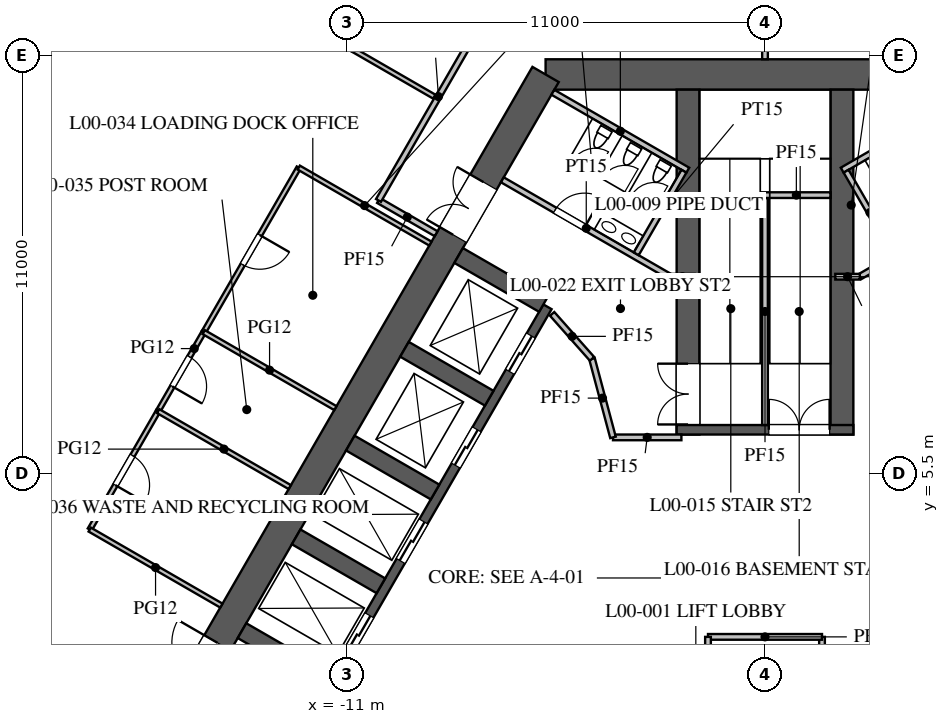
"""IFC4 building model, lengths in metres.
Left out: names, types, materials, properties, quantities, classifications, styles, units other than length and angle.
Written with IfcOpenShell. Run it as: python <this file> out.ifc"""

import sys

from ifc_helpers import new_model, si_unit, direction, frame, frame_2d, origin, place, context, subcontext, project, spatial, polyline, rectangle, outline, extrude, element, fill, save


model = new_model("IFC4")
c1 = context("Model", 3, precision=1e-05, world=origin(), true_north=direction((0.0, 1.0)))
c2 = subcontext(c1, "Body", "Model", "MODEL_VIEW")
j1 = project(units=[si_unit("LENGTHUNIT", "METRE"), si_unit("PLANEANGLEUNIT", "RADIAN")], contexts=[c1])
p1 = place(None, origin())
s1 = spatial("IfcSite", under=j1, at=p1, CompositionType="ELEMENT")
p2 = place(p1, origin())
s2 = spatial("IfcBuilding", under=s1, at=p2, CompositionType="ELEMENT")
p3 = place(p2, origin())
s3 = spatial("IfcBuildingStorey", under=s2, at=p3, CompositionType="ELEMENT", Elevation=0.0)
p4 = place(p3, frame((5.773, 16.0, 0.0), z_axis=(0.0, 0.0, 1.0), x_axis=(-1.0, 0.0, 0.0)))
e1 = element("IfcWall", 1, at=p4, inside=s3, PredefinedType="SHEAR", context=c2, shape_type="SweptSolid", body=[
    extrude(rectangle(XDim=11.547, YDim=0.8, at=frame_2d((5.773, 0.0))), origin(), (0.0, 0.0, 1.0), 6.5),
])
p5 = place(p3, frame((-5.773, 16.0, 0.0), z_axis=(0.0, 0.0, 1.0), x_axis=(-0.500002442456, -0.866023993627, 0.0)))
e2 = element("IfcWall", 2, at=p5, inside=s3, PredefinedType="SHEAR", context=c2, shape_type="SweptSolid", body=[
    extrude(rectangle(XDim=21.939, YDim=0.8, at=frame_2d((10.97, 0.0))), origin(), (0.0, 0.0, 1.0), 6.5),
])
p6 = place(p5, frame((17.27, 0.0, 0.0)))
e3 = element("IfcOpeningElement", 3, at=p6, cuts=e2, PredefinedType="OPENING", context=c2, shape_type="SweptSolid", body=[
    extrude(rectangle(XDim=1.2, YDim=2.1, at=frame_2d((0.6, 1.05))), frame((0.0, 0.41, 0.0), z_axis=(0.0, -1.0, 0.0), x_axis=(1.0, 0.0, 0.0)), (0.0, 0.0, 1.0), 0.82),
])
p7 = place(p5, frame((3.27, 0.0, 0.0)))
e4 = element("IfcOpeningElement", 4, at=p7, cuts=e2, PredefinedType="OPENING", context=c2, shape_type="SweptSolid", body=[
    extrude(rectangle(XDim=1.6, YDim=2.1, at=frame_2d((0.8, 1.05))), frame((0.0, 0.41, 0.0), z_axis=(0.0, -1.0, 0.0), x_axis=(1.0, 0.0, 0.0)), (0.0, 0.0, 1.0), 0.82),
])
p8 = place(p3, frame((-5.724, 9.886, 0.0), z_axis=(0.0, 0.0, 1.0), x_axis=(-0.500001763848, -0.866024385424, 0.0)))
e5 = element("IfcWall", 5, at=p8, inside=s3, PredefinedType="SHEAR", context=c2, shape_type="SweptSolid", body=[
    extrude(rectangle(XDim=11.4, YDim=0.25, at=frame_2d((5.7, 0.0))), origin(), (0.0, 0.0, 1.0), 6.5),
])
p9 = place(p8, frame((0.875, 0.0, 0.0)))
e6 = element("IfcOpeningElement", 6, at=p9, cuts=e5, PredefinedType="OPENING", context=c2, shape_type="SweptSolid", body=[
    extrude(rectangle(XDim=1.1, YDim=2.2, at=frame_2d((0.55, 1.1))), frame((0.0, 0.135, 0.0), z_axis=(0.0, -1.0, 0.0), x_axis=(1.0, 0.0, 0.0)), (0.0, 0.0, 1.0), 0.27),
])
p10 = place(p8, frame((3.725, 0.0, 0.0)))
e7 = element("IfcOpeningElement", 7, at=p10, cuts=e5, PredefinedType="OPENING", context=c2, shape_type="SweptSolid", body=[
    extrude(rectangle(XDim=1.1, YDim=2.2, at=frame_2d((0.55, 1.1))), frame((0.0, 0.135, 0.0), z_axis=(0.0, -1.0, 0.0), x_axis=(1.0, 0.0, 0.0)), (0.0, 0.0, 1.0), 0.27),
])
p11 = place(p8, frame((6.525, 0.0, 0.0)))
e8 = element("IfcOpeningElement", 8, at=p11, cuts=e5, PredefinedType="OPENING", context=c2, shape_type="SweptSolid", body=[
    extrude(rectangle(XDim=1.2, YDim=2.2, at=frame_2d((0.6, 1.1))), frame((0.0, 0.135, 0.0), z_axis=(0.0, -1.0, 0.0), x_axis=(1.0, 0.0, 0.0)), (0.0, 0.0, 1.0), 0.27),
])
p12 = place(p8, frame((9.375, 0.0, 0.0)))
e9 = element("IfcOpeningElement", 9, at=p12, cuts=e5, PredefinedType="OPENING", context=c2, shape_type="SweptSolid", body=[
    extrude(rectangle(XDim=1.2, YDim=2.2, at=frame_2d((0.6, 1.1))), frame((0.0, 0.135, 0.0), z_axis=(0.0, -1.0, 0.0), x_axis=(1.0, 0.0, 0.0)), (0.0, 0.0, 1.0), 0.27),
])
p13 = place(p3, frame((-5.832, 9.949, 0.0), z_axis=(0.0, 0.0, 1.0), x_axis=(-0.866029291668, 0.499993265928, 0.0)))
e10 = element("IfcWall", 10, at=p13, inside=s3, PredefinedType="SHEAR", context=c2, shape_type="SweptSolid", body=[
    extrude(rectangle(XDim=2.575, YDim=0.45, at=frame_2d((1.288, 0.0))), origin(), (0.0, 0.0, 1.0), 6.5),
])
for number, where, z_axis, x_axis in (
    (11, (-7.257, 7.481, 0.0), (0.0, 0.0, 1.0), (-0.866, 0.5, 0.0)),
    (12, (-8.682, 5.012, 0.0), (0.0, 0.0, 1.0), (-0.866, 0.5, 0.0)),
    (13, (-10.107, 2.544, 0.0), (0.0, 0.0, 1.0), (-0.866, 0.5, 0.0)),
    (14, (-11.532, 0.076, 0.0), (0.0, 0.0, 1.0), (-0.866, 0.5, 0.0)),
):
    element("IfcWall", number, at=place(p3, frame(where, z_axis=z_axis, x_axis=x_axis)), inside=s3, PredefinedType="SHEAR", context=c2, shape_type="SweptSolid", body=[
        extrude(rectangle(XDim=2.575, YDim=0.45, at=frame_2d((1.288, 0.0))), origin(), (0.0, 0.0, 1.0), 6.5),
    ])
p14 = place(p3, frame((2.025, 6.525, 0.0), z_axis=(0.0, 0.0, 1.0), x_axis=(0.0, 1.0, 0.0)))
e15 = element("IfcWall", 15, at=p14, inside=s3, PredefinedType="SHEAR", context=c2, shape_type="SweptSolid", body=[
    extrude(rectangle(XDim=9.075, YDim=0.6, at=frame_2d((4.538, 0.0))), origin(), (0.0, 0.0, 1.0), 6.5),
])
p15 = place(p3, frame((-2.025, 6.525, 0.0), z_axis=(0.0, 0.0, 1.0), x_axis=(0.0, 1.0, 0.0)))
e16 = element("IfcWall", 16, at=p15, inside=s3, PredefinedType="SHEAR", context=c2, shape_type="SweptSolid", body=[
    extrude(rectangle(XDim=9.075, YDim=0.6, at=frame_2d((4.538, 0.0))), origin(), (0.0, 0.0, 1.0), 6.5),
])
p16 = place(p15, frame((0.265, 0.0, 0.0)))
e17 = element("IfcOpeningElement", 17, at=p16, cuts=e16, PredefinedType="OPENING", context=c2, shape_type="SweptSolid", body=[
    extrude(rectangle(XDim=1.6, YDim=2.1, at=frame_2d((0.8, 1.05))), frame((0.0, 0.31, 0.0), z_axis=(0.0, -1.0, 0.0), x_axis=(1.0, 0.0, 0.0)), (0.0, 0.0, 1.0), 0.62),
])
p17 = place(p3, frame((2.325, 6.65, 0.0), z_axis=(0.0, 0.0, 1.0), x_axis=(-1.0, 0.0, 0.0)))
e18 = element("IfcWall", 18, at=p17, inside=s3, PredefinedType="SHEAR", context=c2, shape_type="SweptSolid", body=[
    extrude(rectangle(XDim=4.65, YDim=0.25, at=frame_2d((2.325, 0.0))), origin(), (0.0, 0.0, 1.0), 6.5),
])
p18 = place(p17, frame((0.625, 0.0, 0.0)))
e19 = element("IfcOpeningElement", 19, at=p18, cuts=e18, PredefinedType="OPENING", context=c2, shape_type="SweptSolid", body=[
    extrude(rectangle(XDim=1.6, YDim=2.1, at=frame_2d((0.8, 1.05))), frame((0.0, 0.135, 0.0), z_axis=(0.0, -1.0, 0.0), x_axis=(1.0, 0.0, 0.0)), (0.0, 0.0, 1.0), 0.27),
])
p19 = place(p3, frame((2.495, 10.678, 0.0), z_axis=(0.0, 0.0, 1.0), x_axis=(0.86602216432, 0.500005610874, 0.0)))
e20 = element("IfcWall", 20, at=p19, inside=s3, PredefinedType="PARTITIONING", context=c2, shape_type="SweptSolid", body=[
    extrude(rectangle(XDim=5.1, YDim=0.15, at=frame_2d((2.55, 0.0))), origin(), (0.0, 0.0, 1.0), 6.3),
])
p20 = place(p19, frame((1.3, 0.0, 0.0)))
e21 = element("IfcOpeningElement", 21, at=p20, cuts=e20, PredefinedType="OPENING", context=c2, shape_type="SweptSolid", body=[
    extrude(rectangle(XDim=0.9, YDim=2.1, at=frame_2d((0.45, 1.05))), frame((0.0, 0.085, 0.0), z_axis=(0.0, -1.0, 0.0), x_axis=(1.0, 0.0, 0.0)), (0.0, 0.0, 1.0), 0.17),
])
p21 = place(p3, frame((-2.495, 10.678, 0.0), z_axis=(0.0, 0.0, 1.0), x_axis=(-0.86602216432, 0.500005610874, 0.0)))
e22 = element("IfcWall", 22, at=p21, inside=s3, PredefinedType="PARTITIONING", context=c2, shape_type="SweptSolid", body=[
    extrude(rectangle(XDim=5.1, YDim=0.15, at=frame_2d((2.55, 0.0))), origin(), (0.0, 0.0, 1.0), 6.3),
])
p22 = place(p21, frame((2.6, 0.0, 0.0)))
e23 = element("IfcOpeningElement", 23, at=p22, cuts=e22, PredefinedType="OPENING", context=c2, shape_type="SweptSolid", body=[
    extrude(rectangle(XDim=0.9, YDim=2.1, at=frame_2d((0.45, 1.05))), frame((0.0, 0.085, 0.0), z_axis=(0.0, -1.0, 0.0), x_axis=(1.0, 0.0, 0.0)), (0.0, 0.0, 1.0), 0.17),
])
for number, where, z_axis, x_axis in (
    (24, (2.495, 10.678, 0.0), (0.0, 0.0, 1.0), (-1.0, 0.0, 0.0)),
    (25, (-2.495, 10.678, 0.0), (0.0, 0.0, 1.0), (1.0, 0.0, 0.0)),
):
    element("IfcWall", number, at=place(p3, frame(where, z_axis=z_axis, x_axis=x_axis)), inside=s3, PredefinedType="PARTITIONING", context=c2, shape_type="SweptSolid", body=[
        extrude(rectangle(XDim=0.645, YDim=0.15, at=frame_2d((0.323, 0.0))), origin(), (0.0, 0.0, 1.0), 6.3),
    ])
p23 = place(p3, frame((2.031, 13.482, 0.0), z_axis=(0.0, 0.0, 1.0), x_axis=(0.866050731258, 0.499956128963, 0.0)))
e26 = element("IfcWall", 26, at=p23, inside=s3, PredefinedType="PARTITIONING", context=c2, shape_type="SweptSolid", body=[
    extrude(rectangle(XDim=4.1, YDim=0.15, at=frame_2d((2.05, 0.0))), origin(), (0.0, 0.0, 1.0), 6.3),
])
p24 = place(p3, frame((3.389, 11.281, 0.0), z_axis=(0.0, 0.0, 1.0), x_axis=(-0.499989096993, 0.866031698547, 0.0)))
e27 = element("IfcWall", 27, at=p24, inside=s3, PredefinedType="PARTITIONING", context=c2, shape_type="SweptSolid", body=[
    extrude(rectangle(XDim=2.51, YDim=0.15, at=frame_2d((1.255, 0.0))), origin(), (0.0, 0.0, 1.0), 6.3),
])
p25 = place(p3, frame((-2.031, 13.482, 0.0), z_axis=(0.0, 0.0, 1.0), x_axis=(-0.866050731258, 0.499956128963, 0.0)))
e28 = element("IfcWall", 28, at=p25, inside=s3, PredefinedType="PARTITIONING", context=c2, shape_type="SweptSolid", body=[
    extrude(rectangle(XDim=4.1, YDim=0.15, at=frame_2d((2.05, 0.0))), origin(), (0.0, 0.0, 1.0), 6.3),
])
p26 = place(p3, frame((-3.389, 11.281, 0.0), z_axis=(0.0, 0.0, 1.0), x_axis=(0.499989096993, 0.866031698547, 0.0)))
e29 = element("IfcWall", 29, at=p26, inside=s3, PredefinedType="PARTITIONING", context=c2, shape_type="SweptSolid", body=[
    extrude(rectangle(XDim=2.51, YDim=0.15, at=frame_2d((1.255, 0.0))), origin(), (0.0, 0.0, 1.0), 6.3),
])
p27 = place(p3, frame((1.5, -1.2, 0.0), z_axis=(0.0, 0.0, 1.0), x_axis=(0.0, 1.0, 0.0)))
e30 = element("IfcWall", 30, at=p27, inside=s3, PredefinedType="PARTITIONING", context=c2, shape_type="SweptSolid", body=[
    extrude(rectangle(XDim=2.4, YDim=0.15, at=frame_2d((1.2, 0.0))), origin(), (0.0, 0.0, 1.0), 6.3),
])
p28 = place(p3, frame((1.5, 1.2, 0.0), z_axis=(0.0, 0.0, 1.0), x_axis=(-1.0, 0.0, 0.0)))
e31 = element("IfcWall", 31, at=p28, inside=s3, PredefinedType="PARTITIONING", context=c2, shape_type="SweptSolid", body=[
    extrude(rectangle(XDim=3.0, YDim=0.15, at=frame_2d((1.5, 0.0))), origin(), (0.0, 0.0, 1.0), 6.3),
])
p29 = place(p3, frame((-1.5, 1.2, 0.0), z_axis=(0.0, 0.0, 1.0), x_axis=(0.0, -1.0, 0.0)))
e32 = element("IfcWall", 32, at=p29, inside=s3, PredefinedType="PARTITIONING", context=c2, shape_type="SweptSolid", body=[
    extrude(rectangle(XDim=2.4, YDim=0.15, at=frame_2d((1.2, 0.0))), origin(), (0.0, 0.0, 1.0), 6.3),
])
p30 = place(p3, frame((0.0, 16.4, 0.0), z_axis=(0.0, 0.0, 1.0), x_axis=(0.0, 1.0, 0.0)))
e33 = element("IfcWall", 33, at=p30, inside=s3, PredefinedType="PARTITIONING", context=c2, shape_type="SweptSolid", body=[
    extrude(rectangle(XDim=18.25, YDim=0.15, at=frame_2d((9.125, 0.0))), origin(), (0.0, 0.0, 1.0), 4.6),
])
p31 = place(p3, frame((-15.969, 7.141, 0.0), z_axis=(0.0, 0.0, 1.0), x_axis=(-0.500012057535, -0.866018442252, 0.0)))
e34 = element("IfcWall", 34, at=p31, inside=s3, PredefinedType="PARTITIONING", context=c2, shape_type="SweptSolid", body=[
    extrude(rectangle(XDim=3.6, YDim=0.12, at=frame_2d((1.8, 0.0))), origin(), (0.0, 0.0, 1.0), 5.0),
])
p32 = place(p31, frame((1.35, 0.0, 0.0)))
e35 = element("IfcOpeningElement", 35, at=p32, cuts=e34, PredefinedType="OPENING", context=c2, shape_type="SweptSolid", body=[
    extrude(rectangle(XDim=0.9, YDim=2.1, at=frame_2d((0.45, 1.05))), frame((0.0, 0.07, 0.0), z_axis=(0.0, -1.0, 0.0), x_axis=(1.0, 0.0, 0.0)), (0.0, 0.0, 1.0), 0.14),
])
p33 = place(p3, frame((-14.769, 9.22, 0.0), z_axis=(0.0, 0.0, 1.0), x_axis=(-0.499957262057, -0.866050077142, 0.0)))
e36 = element("IfcWall", 36, at=p33, inside=s3, PredefinedType="PARTITIONING", context=c2, shape_type="SweptSolid", body=[
    extrude(rectangle(XDim=2.4, YDim=0.12, at=frame_2d((1.2, 0.0))), origin(), (0.0, 0.0, 1.0), 5.0),
])
p34 = place(p33, frame((0.75, 0.0, 0.0)))
e37 = element("IfcOpeningElement", 37, at=p34, cuts=e36, PredefinedType="OPENING", context=c2, shape_type="SweptSolid", body=[
    extrude(rectangle(XDim=0.9, YDim=2.1, at=frame_2d((0.45, 1.05))), frame((0.0, 0.07, 0.0), z_axis=(0.0, -1.0, 0.0), x_axis=(1.0, 0.0, 0.0)), (0.0, 0.0, 1.0), 0.14),
])
p35 = place(p3, frame((-12.269, 13.55, 0.0), z_axis=(0.0, 0.0, 1.0), x_axis=(-0.500004234368, -0.866022959057, 0.0)))
e38 = element("IfcWall", 38, at=p35, inside=s3, PredefinedType="PARTITIONING", context=c2, shape_type="SweptSolid", body=[
    extrude(rectangle(XDim=5.0, YDim=0.12, at=frame_2d((2.5, 0.0))), origin(), (0.0, 0.0, 1.0), 5.0),
])
p36 = place(p35, frame((2.05, 0.0, 0.0)))
e39 = element("IfcOpeningElement", 39, at=p36, cuts=e38, PredefinedType="OPENING", context=c2, shape_type="SweptSolid", body=[
    extrude(rectangle(XDim=0.9, YDim=2.1, at=frame_2d((0.45, 1.05))), frame((0.0, 0.07, 0.0), z_axis=(0.0, -1.0, 0.0), x_axis=(1.0, 0.0, 0.0)), (0.0, 0.0, 1.0), 0.14),
])
for number, where, z_axis, x_axis in (
    (40, (-12.505, 5.141, 0.0), (0.0, 0.0, 1.0), (-0.866, 0.5, 0.0)),
    (41, (-14.305, 2.023, 0.0), (0.0, 0.0, 1.0), (-0.866, 0.5, 0.0)),
    (42, (-11.305, 7.22, 0.0), (0.0, 0.0, 1.0), (-0.866, 0.5, 0.0)),
    (43, (-8.805, 11.55, 0.0), (0.0, 0.0, 1.0), (-0.866, 0.5, 0.0)),
):
    element("IfcWall", number, at=place(p3, frame(where, z_axis=z_axis, x_axis=x_axis)), inside=s3, PredefinedType="PARTITIONING", context=c2, shape_type="SweptSolid", body=[
        extrude(rectangle(XDim=4.0, YDim=0.12, at=frame_2d((2.0, 0.0))), origin(), (0.0, 0.0, 1.0), 5.0),
    ])
p37 = place(p3, frame((-8.703, 15.417, 0.0), z_axis=(0.0, 0.0, 1.0), x_axis=(-0.866031156864, 0.499990035242, 0.0)))
e44 = element("IfcWall", 44, at=p37, inside=s3, PredefinedType="PARTITIONING", context=c2, shape_type="SweptSolid", body=[
    extrude(rectangle(XDim=10.61, YDim=0.12, at=frame_2d((5.305, 0.0))), origin(), (0.0, 0.0, 1.0), 5.0),
])
p38 = place(p37, frame((2.45, 0.0, 0.0)))
e45 = element("IfcOpeningElement", 45, at=p38, cuts=e44, PredefinedType="OPENING", context=c2, shape_type="SweptSolid", body=[
    extrude(rectangle(XDim=0.9, YDim=2.1, at=frame_2d((0.45, 1.05))), frame((0.0, 0.07, 0.0), z_axis=(0.0, -1.0, 0.0), x_axis=(1.0, 0.0, 0.0)), (0.0, 0.0, 1.0), 0.14),
])
p39 = place(p3, frame((0.0, 6.775, 0.0), z_axis=(0.0, 0.0, 1.0), x_axis=(0.0, 1.0, 0.0)))
e46 = element("IfcWall", 46, at=p39, inside=s3, PredefinedType="PARTITIONING", context=c2, shape_type="SweptSolid", body=[
    extrude(outline(polyline([(0.0, 0.0), (5.975, 0.0), (5.975, 4.014), (1.966, 6.3), (0.0, 6.3), (0.0, 0.0)])), frame((0.0, 0.075, 0.0), z_axis=(0.0, -1.0, 0.0), x_axis=(1.0, 0.0, 0.0)), (0.0, 0.0, 1.0), 0.15),
])
p40 = place(p3, frame((1.725, 12.825, 0.0), z_axis=(0.0, 0.0, 1.0), x_axis=(-1.0, 0.0, 0.0)))
e47 = element("IfcWall", 47, at=p40, inside=s3, PredefinedType="PARTITIONING", context=c2, shape_type="SweptSolid", body=[
    extrude(rectangle(XDim=1.8, YDim=0.15, at=frame_2d((0.9, 0.0))), origin(), (0.0, 0.0, 1.0), 3.575),
])
p41 = place(p3, frame((-2.2, 6.45, 0.0), z_axis=(0.0, 0.0, 1.0), x_axis=(-1.0, 0.0, 0.0)))
e48 = element("IfcWall", 48, at=p41, inside=s3, PredefinedType="PARTITIONING", context=c2, shape_type="SweptSolid", body=[
    extrude(rectangle(XDim=1.8, YDim=0.15, at=frame_2d((0.9, 0.0))), origin(), (0.0, 0.0, 1.0), 6.3),
])
p42 = place(p3, frame((-4.0, 6.45, 0.0), z_axis=(0.0, 0.0, 1.0), x_axis=(-0.257811817012, 0.966195149547, 0.0)))
e49 = element("IfcWall", 49, at=p42, inside=s3, PredefinedType="PARTITIONING", context=c2, shape_type="SweptSolid", body=[
    extrude(rectangle(XDim=2.139, YDim=0.15, at=frame_2d((1.07, 0.0))), origin(), (0.0, 0.0, 1.0), 6.3),
])
p43 = place(p3, frame((-4.552, 8.517, 0.0), z_axis=(0.0, 0.0, 1.0), x_axis=(-0.663443129067, 0.748226713299, 0.0)))
e50 = element("IfcWall", 50, at=p43, inside=s3, PredefinedType="PARTITIONING", context=c2, shape_type="SweptSolid", body=[
    extrude(rectangle(XDim=1.581, YDim=0.15, at=frame_2d((0.791, 0.0))), origin(), (0.0, 0.0, 1.0), 6.3),
])
p44 = place(p3, frame((-8.655, 11.81, 0.0), z_axis=(0.0, 0.0, 1.0), x_axis=(-0.866002029911, 0.500040482552, 0.0)))
e51 = element("IfcWall", 51, at=p44, inside=s3, PredefinedType="PARTITIONING", context=c2, shape_type="SweptSolid", body=[
    extrude(rectangle(XDim=1.75, YDim=0.15, at=frame_2d((0.875, 0.0))), origin(), (0.0, 0.0, 1.0), 6.3),
])
p45 = place(p3, frame((-10.17, 12.685, 0.0), z_axis=(0.0, 0.0, 1.0), x_axis=(0.4999836609, 0.866034836963, 0.0)))
e52 = element("IfcWall", 52, at=p45, inside=s3, PredefinedType="PARTITIONING", context=c2, shape_type="SweptSolid", body=[
    extrude(rectangle(XDim=6.311, YDim=0.15, at=frame_2d((3.155, 0.0))), origin(), (0.0, 0.0, 1.0), 6.3),
])
p46 = place(p22, frame((0.9, 0.0, 0.0), z_axis=(0.0, 0.0, 1.0), x_axis=(-1.0, 0.0, 0.0)))
e53 = element("IfcDoor", 53, at=p46, inside=s3, OperationType="SINGLE_SWING_RIGHT", PredefinedType="DOOR", context=c2, shape_type="SweptSolid", body=[
    extrude(rectangle(XDim=0.9, YDim=2.1, at=frame_2d((0.45, 1.05))), frame((0.0, 0.025, 0.0), z_axis=(0.0, -1.0, 0.0), x_axis=(1.0, 0.0, 0.0)), (0.0, 0.0, 1.0), 0.05),
])
fill(e23, e53)
p47 = place(p6, frame((1.2, 0.0, 0.0), z_axis=(0.0, 0.0, 1.0), x_axis=(-1.0, 0.0, 0.0)))
e54 = element("IfcDoor", 54, at=p47, inside=s3, OperationType="SINGLE_SWING_RIGHT", PredefinedType="DOOR", context=c2, shape_type="SweptSolid", body=[
    extrude(rectangle(XDim=1.2, YDim=2.1, at=frame_2d((0.6, 1.05))), frame((0.0, 0.025, 0.0), z_axis=(0.0, -1.0, 0.0), x_axis=(1.0, 0.0, 0.0)), (0.0, 0.0, 1.0), 0.05),
])
fill(e3, e54)
p48 = place(p7, frame((1.6, 0.0, 0.0), z_axis=(0.0, 0.0, 1.0), x_axis=(-1.0, 0.0, 0.0)))
e55 = element("IfcDoor", 55, at=p48, inside=s3, OperationType="DOUBLE_DOOR_SINGLE_SWING", PredefinedType="DOOR", context=c2, shape_type="SweptSolid", body=[
    extrude(rectangle(XDim=1.6, YDim=2.1, at=frame_2d((0.8, 1.05))), frame((0.0, 0.025, 0.0), z_axis=(0.0, -1.0, 0.0), x_axis=(1.0, 0.0, 0.0)), (0.0, 0.0, 1.0), 0.05),
])
fill(e4, e55)
p49 = place(p36, origin())
e56 = element("IfcDoor", 56, at=p49, inside=s3, OperationType="SINGLE_SWING_LEFT", PredefinedType="DOOR", context=c2, shape_type="SweptSolid", body=[
    extrude(rectangle(XDim=0.9, YDim=2.1, at=frame_2d((0.45, 1.05))), frame((0.0, 0.025, 0.0), z_axis=(0.0, -1.0, 0.0), x_axis=(1.0, 0.0, 0.0)), (0.0, 0.0, 1.0), 0.05),
])
fill(e39, e56)
p50 = place(p34, origin())
e57 = element("IfcDoor", 57, at=p50, inside=s3, OperationType="SINGLE_SWING_RIGHT", PredefinedType="DOOR", context=c2, shape_type="SweptSolid", body=[
    extrude(rectangle(XDim=0.9, YDim=2.1, at=frame_2d((0.45, 1.05))), frame((0.0, 0.025, 0.0), z_axis=(0.0, -1.0, 0.0), x_axis=(1.0, 0.0, 0.0)), (0.0, 0.0, 1.0), 0.05),
])
fill(e37, e57)
p51 = place(p32, origin())
e58 = element("IfcDoor", 58, at=p51, inside=s3, OperationType="SINGLE_SWING_RIGHT", PredefinedType="DOOR", context=c2, shape_type="SweptSolid", body=[
    extrude(rectangle(XDim=0.9, YDim=2.1, at=frame_2d((0.45, 1.05))), frame((0.0, 0.025, 0.0), z_axis=(0.0, -1.0, 0.0), x_axis=(1.0, 0.0, 0.0)), (0.0, 0.0, 1.0), 0.05),
])
fill(e35, e58)
p52 = place(p18, frame((1.6, 0.0, 0.0), z_axis=(0.0, 0.0, 1.0), x_axis=(-1.0, 0.0, 0.0)))
e59 = element("IfcDoor", 59, at=p52, inside=s3, OperationType="DOUBLE_DOOR_SINGLE_SWING", PredefinedType="DOOR", context=c2, shape_type="SweptSolid", body=[
    extrude(rectangle(XDim=1.6, YDim=2.1, at=frame_2d((0.8, 1.05))), frame((0.0, 0.025, 0.0), z_axis=(0.0, -1.0, 0.0), x_axis=(1.0, 0.0, 0.0)), (0.0, 0.0, 1.0), 0.05),
])
fill(e19, e59)
p53 = place(p16, origin())
e60 = element("IfcDoor", 60, at=p53, inside=s3, OperationType="DOUBLE_DOOR_SINGLE_SWING", PredefinedType="DOOR", context=c2, shape_type="SweptSolid", body=[
    extrude(rectangle(XDim=1.6, YDim=2.1, at=frame_2d((0.8, 1.05))), frame((0.0, 0.025, 0.0), z_axis=(0.0, -1.0, 0.0), x_axis=(1.0, 0.0, 0.0)), (0.0, 0.0, 1.0), 0.05),
])
fill(e17, e60)
p54 = place(p9, origin())
e61 = element("IfcDoor", 61, at=p54, inside=s3, OperationType="DOUBLE_DOOR_SLIDING", PredefinedType="DOOR", context=c2, shape_type="SweptSolid", body=[
    extrude(rectangle(XDim=1.1, YDim=2.2, at=frame_2d((0.55, 1.1))), frame((0.0, 0.025, 0.0), z_axis=(0.0, -1.0, 0.0), x_axis=(1.0, 0.0, 0.0)), (0.0, 0.0, 1.0), 0.05),
])
fill(e6, e61)
p55 = place(p10, origin())
e62 = element("IfcDoor", 62, at=p55, inside=s3, OperationType="DOUBLE_DOOR_SLIDING", PredefinedType="DOOR", context=c2, shape_type="SweptSolid", body=[
    extrude(rectangle(XDim=1.1, YDim=2.2, at=frame_2d((0.55, 1.1))), frame((0.0, 0.025, 0.0), z_axis=(0.0, -1.0, 0.0), x_axis=(1.0, 0.0, 0.0)), (0.0, 0.0, 1.0), 0.05),
])
fill(e7, e62)
p56 = place(p11, origin())
e63 = element("IfcDoor", 63, at=p56, inside=s3, OperationType="DOUBLE_DOOR_SLIDING", PredefinedType="DOOR", context=c2, shape_type="SweptSolid", body=[
    extrude(rectangle(XDim=1.2, YDim=2.2, at=frame_2d((0.6, 1.1))), frame((0.0, 0.025, 0.0), z_axis=(0.0, -1.0, 0.0), x_axis=(1.0, 0.0, 0.0)), (0.0, 0.0, 1.0), 0.05),
])
fill(e8, e63)
p57 = place(p12, origin())
e64 = element("IfcDoor", 64, at=p57, inside=s3, OperationType="DOUBLE_DOOR_SLIDING", PredefinedType="DOOR", context=c2, shape_type="SweptSolid", body=[
    extrude(rectangle(XDim=1.2, YDim=2.2, at=frame_2d((0.6, 1.1))), frame((0.0, 0.025, 0.0), z_axis=(0.0, -1.0, 0.0), x_axis=(1.0, 0.0, 0.0)), (0.0, 0.0, 1.0), 0.05),
])
fill(e9, e64)
save(model, sys.argv[1])
